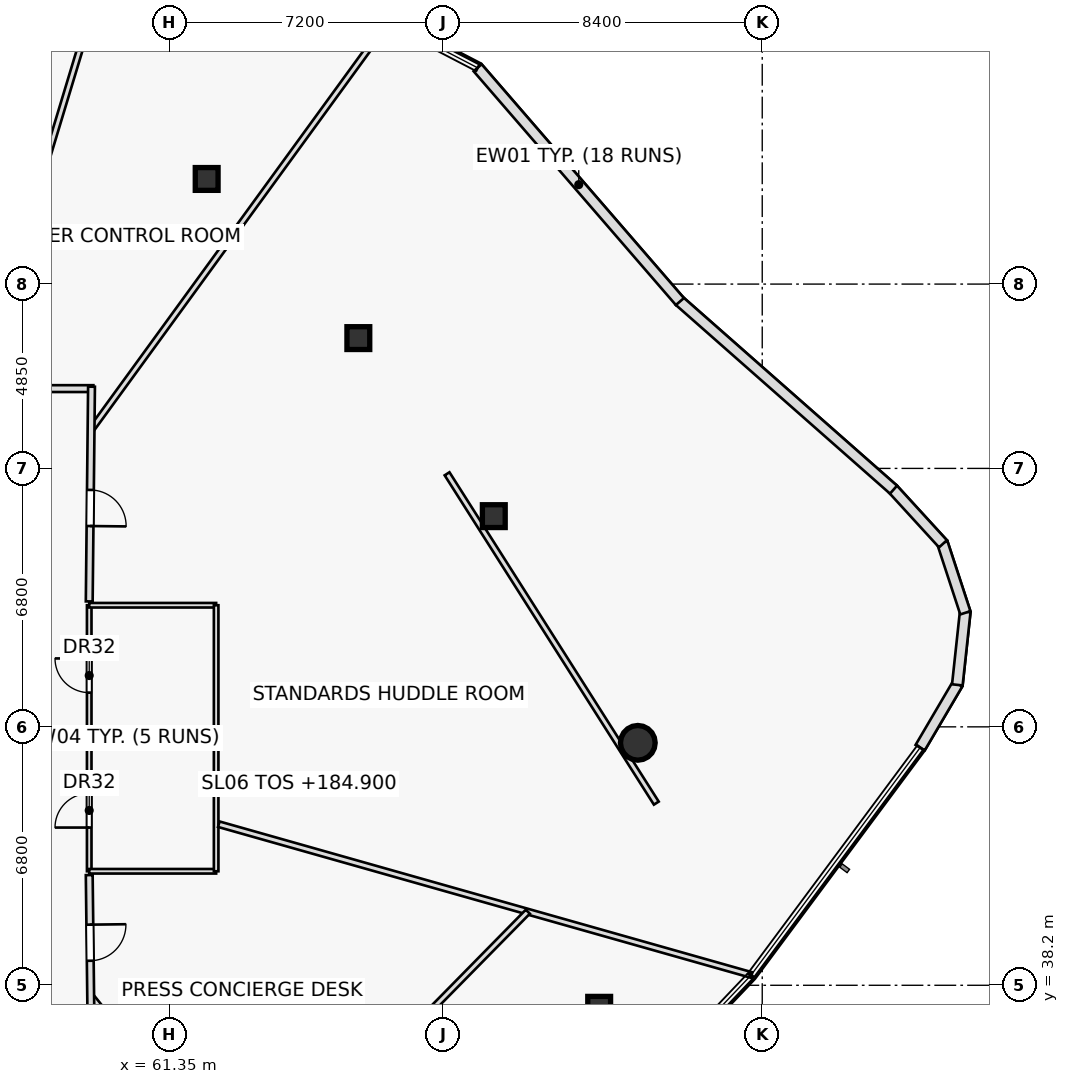
"""IFC4 building model, lengths in metres.
Left out: names, types, materials, properties, quantities, classifications, styles, units other than length and angle.
Written with IfcOpenShell. Run it as: python <this file> out.ifc"""

import sys

from ifc_helpers import new_model, si_unit, direction, frame, frame_2d, origin, origin_2d, place, context, subcontext, project, spatial, rectangle, hollow_rectangle, hollow_circle, extrude, element, fill, save


model = new_model("IFC4")
c1 = context("Model", 3, precision=1e-05, world=origin(), true_north=direction((0.0, 1.0)))
c2 = subcontext(c1, "Body", "Model", "MODEL_VIEW")
j1 = project(units=[si_unit("LENGTHUNIT", "METRE"), si_unit("PLANEANGLEUNIT", "RADIAN")], contexts=[c1])
p1 = place(None, origin())
s1 = spatial("IfcSite", under=j1, at=p1, CompositionType="ELEMENT")
p2 = place(p1, origin())
s2 = spatial("IfcBuilding", under=s1, at=p2, CompositionType="ELEMENT")
p3 = place(p2, frame((0.0, 0.0, 184.9)))
s3 = spatial("IfcBuildingStorey", under=s2, at=p3, CompositionType="ELEMENT", Elevation=184.9)
p4 = place(p3, frame((72.659, 37.607, 0.0), z_axis=(0.0, 0.0, 1.0), x_axis=(1.0, 0.0, 0.0)))
e1 = element("IfcColumn", 1, at=p4, inside=s3, PredefinedType="COLUMN", context=c2, shape_type="SweptSolid", body=[
    extrude(hollow_rectangle(XDim=0.6, YDim=0.6, WallThickness=0.036, at=origin_2d()), origin(), (0.0, 0.0, 1.0), 3.55),
])
p5 = place(p3, frame((73.676, 44.58, 0.0), z_axis=(0.0, 0.0, 1.0), x_axis=(1.0, 0.0, 0.0)))
e2 = element("IfcColumn", 2, at=p5, inside=s3, PredefinedType="COLUMN", context=c2, shape_type="SweptSolid", body=[
    extrude(hollow_circle(Radius=0.457, WallThickness=0.04, at=origin_2d()), origin(), (0.0, 0.0, 1.0), 3.55),
])
for number, where, z_axis, x_axis in (
    (3, (69.886, 50.544, 0.0), (0.0, 0.0, 1.0), (1.0, 0.0, 0.0)),
    (4, (66.322, 55.229, 0.0), (0.0, 0.0, 1.0), (1.0, 0.0, 0.0)),
    (5, (62.331, 59.416, 0.0), (0.0, 0.0, 1.0), (1.0, 0.0, 0.0)),
):
    element("IfcColumn", number, at=place(p3, frame(where, z_axis=z_axis, x_axis=x_axis)), inside=s3, PredefinedType="COLUMN", context=c2, shape_type="SweptSolid", body=[
        extrude(hollow_rectangle(XDim=0.6, YDim=0.6, WallThickness=0.036, at=origin_2d()), origin(), (0.0, 0.0, 1.0), 3.55),
    ])
p6 = place(p3, frame((74.163, 42.993, 0.0), z_axis=(0.0, 0.0, 1.0), x_axis=(-0.53628142437, 0.844039237166, 0.0)))
e6 = element("IfcWall", 6, at=p6, inside=s3, PredefinedType="PARTITIONING", context=c2, shape_type="SweptSolid", body=[
    extrude(rectangle(XDim=10.267, YDim=0.15, at=frame_2d((5.133, 0.0))), origin(), (0.0, 0.0, 1.0), 2.935),
])
p7 = place(p3, frame((59.24, 41.2, 0.0), z_axis=(0.0, 0.0, 1.0), x_axis=(0.0, 1.0, 0.0)))
e7 = element("IfcWall", 7, at=p7, inside=s3, PredefinedType="PARTITIONING", context=c2, shape_type="SweptSolid", body=[
    extrude(rectangle(XDim=7.0, YDim=0.12, at=frame_2d((3.5, 0.0))), origin(), (0.0, 0.0, 1.0), 3.55),
])
p8 = place(p7, frame((1.15, 0.0, 0.0)))
e8 = element("IfcOpeningElement", 8, at=p8, cuts=e7, PredefinedType="OPENING", context=c2, shape_type="SweptSolid", body=[
    extrude(rectangle(XDim=0.9, YDim=2.05, at=frame_2d((0.45, 1.025))), frame((0.0, 0.07, 0.0), z_axis=(0.0, -1.0, 0.0), x_axis=(1.0, 0.0, 0.0)), (0.0, 0.0, 1.0), 0.14),
])
p9 = place(p7, frame((4.7, 0.0, 0.0)))
e9 = element("IfcOpeningElement", 9, at=p9, cuts=e7, PredefinedType="OPENING", context=c2, shape_type="SweptSolid", body=[
    extrude(rectangle(XDim=0.9, YDim=2.05, at=frame_2d((0.45, 1.025))), frame((0.0, 0.07, 0.0), z_axis=(0.0, -1.0, 0.0), x_axis=(1.0, 0.0, 0.0)), (0.0, 0.0, 1.0), 0.14),
])
for number, where, z_axis, x_axis in (
    (10, (59.24, 41.2, 0.0), (0.0, 0.0, 1.0), (1.0, 0.0, 0.0)),
    (11, (59.24, 44.65, 0.0), (0.0, 0.0, 1.0), (1.0, 0.0, 0.0)),
    (12, (59.24, 48.2, 0.0), (0.0, 0.0, 1.0), (1.0, 0.0, 0.0)),
):
    element("IfcWall", number, at=place(p3, frame(where, z_axis=z_axis, x_axis=x_axis)), inside=s3, PredefinedType="PARTITIONING", context=c2, shape_type="SweptSolid", body=[
        extrude(rectangle(XDim=3.34, YDim=0.12, at=frame_2d((1.67, 0.0))), origin(), (0.0, 0.0, 1.0), 3.55),
    ])
p10 = place(p3, frame((62.58, 41.2, 0.0), z_axis=(0.0, 0.0, 1.0), x_axis=(0.0, 1.0, 0.0)))
e13 = element("IfcWall", 13, at=p10, inside=s3, PredefinedType="PARTITIONING", context=c2, shape_type="SweptSolid", body=[
    extrude(rectangle(XDim=7.0, YDim=0.12, at=frame_2d((3.5, 0.0))), origin(), (0.0, 0.0, 1.0), 3.55),
])
p11 = place(p3, frame((59.278, 37.923, 0.0), z_axis=(0.0, 0.0, 1.0), x_axis=(0.625811087675, -0.779974667885, 0.0)))
e14 = element("IfcWall", 14, at=p11, inside=s3, PredefinedType="PARTITIONING", context=c2, shape_type="SweptSolid", body=[
    extrude(rectangle(XDim=11.545, YDim=0.15, at=frame_2d((5.772, 0.0))), origin(), (0.0, 0.0, 1.0), 2.935),
])
p12 = place(p3, frame((62.65, 42.438, 0.0), z_axis=(0.0, 0.0, 1.0), x_axis=(0.962191299286, -0.272374564852, 0.0)))
e15 = element("IfcWall", 15, at=p12, inside=s3, PredefinedType="PARTITIONING", context=c2, shape_type="SweptSolid", body=[
    extrude(rectangle(XDim=14.571, YDim=0.15, at=frame_2d((7.286, 0.0))), origin(), (0.0, 0.0, 1.0), 2.935),
])
p13 = place(p3, frame((59.289, 52.814, 0.0), z_axis=(0.0, 0.0, 1.0), x_axis=(0.588526256587, 0.808478104408, 0.0)))
e16 = element("IfcWall", 16, at=p13, inside=s3, PredefinedType="PARTITIONING", context=c2, shape_type="SweptSolid", body=[
    extrude(rectangle(XDim=13.304, YDim=0.15, at=frame_2d((6.652, 0.0))), origin(), (0.0, 0.0, 1.0), 3.025),
])
p14 = place(p3, frame((56.294, 53.9, 0.0), z_axis=(0.0, 0.0, 1.0), x_axis=(0.289678173214, 0.957124106876, 0.0)))
e17 = element("IfcWall", 17, at=p14, inside=s3, PredefinedType="PARTITIONING", context=c2, shape_type="SweptSolid", body=[
    extrude(rectangle(XDim=13.461, YDim=0.15, at=frame_2d((6.73, 0.0))), origin(), (0.0, 0.0, 1.0), 2.935),
])
p15 = place(p14, frame((1.35, 0.0, 0.0)))
e18 = element("IfcOpeningElement", 18, at=p15, cuts=e17, PredefinedType="OPENING", context=c2, shape_type="SweptSolid", body=[
    extrude(rectangle(XDim=0.95, YDim=2.05, at=frame_2d((0.475, 1.025))), frame((0.0, 0.085, 0.0), z_axis=(0.0, -1.0, 0.0), x_axis=(1.0, 0.0, 0.0)), (0.0, 0.0, 1.0), 0.17),
])
p16 = place(p3, frame((63.469, 32.7, 0.0), z_axis=(0.0, 0.0, 1.0), x_axis=(0.701171291032, 0.712992861558, 0.0)))
e19 = element("IfcWall", 19, at=p16, inside=s3, PredefinedType="PARTITIONING", context=c2, shape_type="SweptSolid", body=[
    extrude(rectangle(XDim=10.429, YDim=0.15, at=frame_2d((5.215, 0.0))), origin(), (0.0, 0.0, 1.0), 2.935),
])
p17 = place(p16, frame((4.74, 0.0, 0.0)))
e20 = element("IfcOpeningElement", 20, at=p17, cuts=e19, PredefinedType="OPENING", context=c2, shape_type="SweptSolid", body=[
    extrude(rectangle(XDim=0.95, YDim=2.05, at=frame_2d((0.475, 1.025))), frame((0.0, 0.085, 0.0), z_axis=(0.0, -1.0, 0.0), x_axis=(1.0, 0.0, 0.0)), (0.0, 0.0, 1.0), 0.17),
])
p18 = place(p3, frame((54.3, 53.9, 0.0), z_axis=(0.0, 0.0, 1.0), x_axis=(1.0, 0.0, 0.0)))
e21 = element("IfcWall", 21, at=p18, inside=s3, PredefinedType="PARTITIONING", context=c2, shape_type="SweptSolid", body=[
    extrude(rectangle(XDim=5.05, YDim=0.18, at=frame_2d((2.525, 0.0))), origin(), (0.0, 0.0, 1.0), 2.935),
])
p19 = place(p18, frame((2.947, 0.0, 0.0)))
e22 = element("IfcOpeningElement", 22, at=p19, cuts=e21, PredefinedType="OPENING", context=c2, shape_type="SweptSolid", body=[
    extrude(rectangle(XDim=0.95, YDim=2.05, at=frame_2d((0.475, 1.025))), frame((0.0, 0.1, 0.0), z_axis=(0.0, -1.0, 0.0), x_axis=(1.0, 0.0, 0.0)), (0.0, 0.0, 1.0), 0.2),
])
p20 = place(p3, frame((59.301, 53.95, 0.0), z_axis=(0.0, 0.0, 1.0), x_axis=(-0.010629422803, -0.99994350609, 0.0)))
e23 = element("IfcWall", 23, at=p20, inside=s3, PredefinedType="PARTITIONING", context=c2, shape_type="SweptSolid", body=[
    extrude(rectangle(XDim=5.65, YDim=0.18, at=frame_2d((2.825, 0.0))), origin(), (0.0, 0.0, 1.0), 2.935),
])
p21 = place(p20, frame((2.716, 0.0, 0.0)))
e24 = element("IfcOpeningElement", 24, at=p21, cuts=e23, PredefinedType="OPENING", context=c2, shape_type="SweptSolid", body=[
    extrude(rectangle(XDim=0.95, YDim=2.05, at=frame_2d((0.475, 1.025))), frame((0.0, 0.1, 0.0), z_axis=(0.0, -1.0, 0.0), x_axis=(1.0, 0.0, 0.0)), (0.0, 0.0, 1.0), 0.2),
])
p22 = place(p3, frame((59.24, 41.1, 0.0), z_axis=(0.0, 0.0, 1.0), x_axis=(0.011891834917, -0.999929289631, 0.0)))
e25 = element("IfcWall", 25, at=p22, inside=s3, PredefinedType="PARTITIONING", context=c2, shape_type="SweptSolid", body=[
    extrude(rectangle(XDim=5.05, YDim=0.18, at=frame_2d((2.525, 0.0))), origin(), (0.0, 0.0, 1.0), 2.935),
])
p23 = place(p22, frame((1.305, 0.0, 0.0)))
e26 = element("IfcOpeningElement", 26, at=p23, cuts=e25, PredefinedType="OPENING", context=c2, shape_type="SweptSolid", body=[
    extrude(rectangle(XDim=0.95, YDim=2.05, at=frame_2d((0.475, 1.025))), frame((0.0, 0.1, 0.0), z_axis=(0.0, -1.0, 0.0), x_axis=(1.0, 0.0, 0.0)), (0.0, 0.0, 1.0), 0.2),
])
p24 = place(p3, frame((81.105, 44.453, 0.0), z_axis=(0.0, 0.0, 1.0), x_axis=(0.506828463584, 0.862046929408, 0.0)))
e27 = element("IfcWall", 27, at=p24, inside=s3, PredefinedType="STANDARD", context=c2, shape_type="SweptSolid", body=[
    extrude(rectangle(XDim=1.948, YDim=0.28, at=frame_2d((0.974, 0.0))), origin(), (0.0, 0.0, 1.0), 3.55),
])
for number, where, z_axis, x_axis in (
    (28, (82.084, 46.104, 0.0), (0.0, 0.0, 1.0), (0.107, 0.994, 0.0)),
    (29, (82.294, 48.001, 0.0), (0.0, 0.0, 1.0), (-0.311, 0.95, 0.0)),
):
    element("IfcWall", number, at=place(p3, frame(where, z_axis=z_axis, x_axis=x_axis)), inside=s3, PredefinedType="STANDARD", context=c2, shape_type="SweptSolid", body=[
        extrude(rectangle(XDim=1.937, YDim=0.28, at=frame_2d((0.969, 0.0))), origin(), (0.0, 0.0, 1.0), 3.55),
    ])
p25 = place(p3, frame((81.706, 49.816, 0.0), z_axis=(0.0, 0.0, 1.0), x_axis=(-0.674945633621, 0.73786746212, 0.0)))
e30 = element("IfcWall", 30, at=p25, inside=s3, PredefinedType="STANDARD", context=c2, shape_type="SweptSolid", body=[
    extrude(rectangle(XDim=1.959, YDim=0.28, at=frame_2d((0.98, 0.0))), origin(), (0.0, 0.0, 1.0), 3.55),
])
p26 = place(p3, frame((80.405, 51.241, 0.0), z_axis=(0.0, 0.0, 1.0), x_axis=(-0.75040040483, 0.660983534161, 0.0)))
e31 = element("IfcWall", 31, at=p26, inside=s3, PredefinedType="STANDARD", context=c2, shape_type="SweptSolid", body=[
    extrude(rectangle(XDim=7.52, YDim=0.28, at=frame_2d((3.76, 0.0))), origin(), (0.0, 0.0, 1.0), 3.55),
])
p27 = place(p3, frame((74.783, 56.19, 0.0), z_axis=(0.0, 0.0, 1.0), x_axis=(-0.654266528011, 0.756264048018, 0.0)))
e32 = element("IfcWall", 32, at=p27, inside=s3, PredefinedType="STANDARD", context=c2, shape_type="SweptSolid", body=[
    extrude(rectangle(XDim=8.136, YDim=0.28, at=frame_2d((4.068, 0.0))), origin(), (0.0, 0.0, 1.0), 3.55),
])
p28 = place(p8, origin())
e33 = element("IfcDoor", 33, at=p28, inside=s3, OperationType="SINGLE_SWING_LEFT", PredefinedType="DOOR", context=c2, shape_type="SweptSolid", body=[
    extrude(rectangle(XDim=0.9, YDim=2.05, at=frame_2d((0.45, 1.025))), frame((0.0, 0.025, 0.0), z_axis=(0.0, -1.0, 0.0), x_axis=(1.0, 0.0, 0.0)), (0.0, 0.0, 1.0), 0.05),
])
fill(e8, e33)
p29 = place(p9, origin())
e34 = element("IfcDoor", 34, at=p29, inside=s3, OperationType="SINGLE_SWING_RIGHT", PredefinedType="DOOR", context=c2, shape_type="SweptSolid", body=[
    extrude(rectangle(XDim=0.9, YDim=2.05, at=frame_2d((0.45, 1.025))), frame((0.0, 0.025, 0.0), z_axis=(0.0, -1.0, 0.0), x_axis=(1.0, 0.0, 0.0)), (0.0, 0.0, 1.0), 0.05),
])
fill(e9, e34)
p30 = place(p21, origin())
e35 = element("IfcDoor", 35, at=p30, inside=s3, OperationType="SINGLE_SWING_RIGHT", PredefinedType="DOOR", context=c2, shape_type="SweptSolid", body=[
    extrude(rectangle(XDim=0.95, YDim=2.05, at=frame_2d((0.475, 1.025))), frame((0.0, 0.025, 0.0), z_axis=(0.0, -1.0, 0.0), x_axis=(1.0, 0.0, 0.0)), (0.0, 0.0, 1.0), 0.05),
])
fill(e24, e35)
p31 = place(p23, origin())
e36 = element("IfcDoor", 36, at=p31, inside=s3, OperationType="SINGLE_SWING_LEFT", PredefinedType="DOOR", context=c2, shape_type="SweptSolid", body=[
    extrude(rectangle(XDim=0.95, YDim=2.05, at=frame_2d((0.475, 1.025))), frame((0.0, 0.025, 0.0), z_axis=(0.0, -1.0, 0.0), x_axis=(1.0, 0.0, 0.0)), (0.0, 0.0, 1.0), 0.05),
])
fill(e26, e36)
save(model, sys.argv[1])
